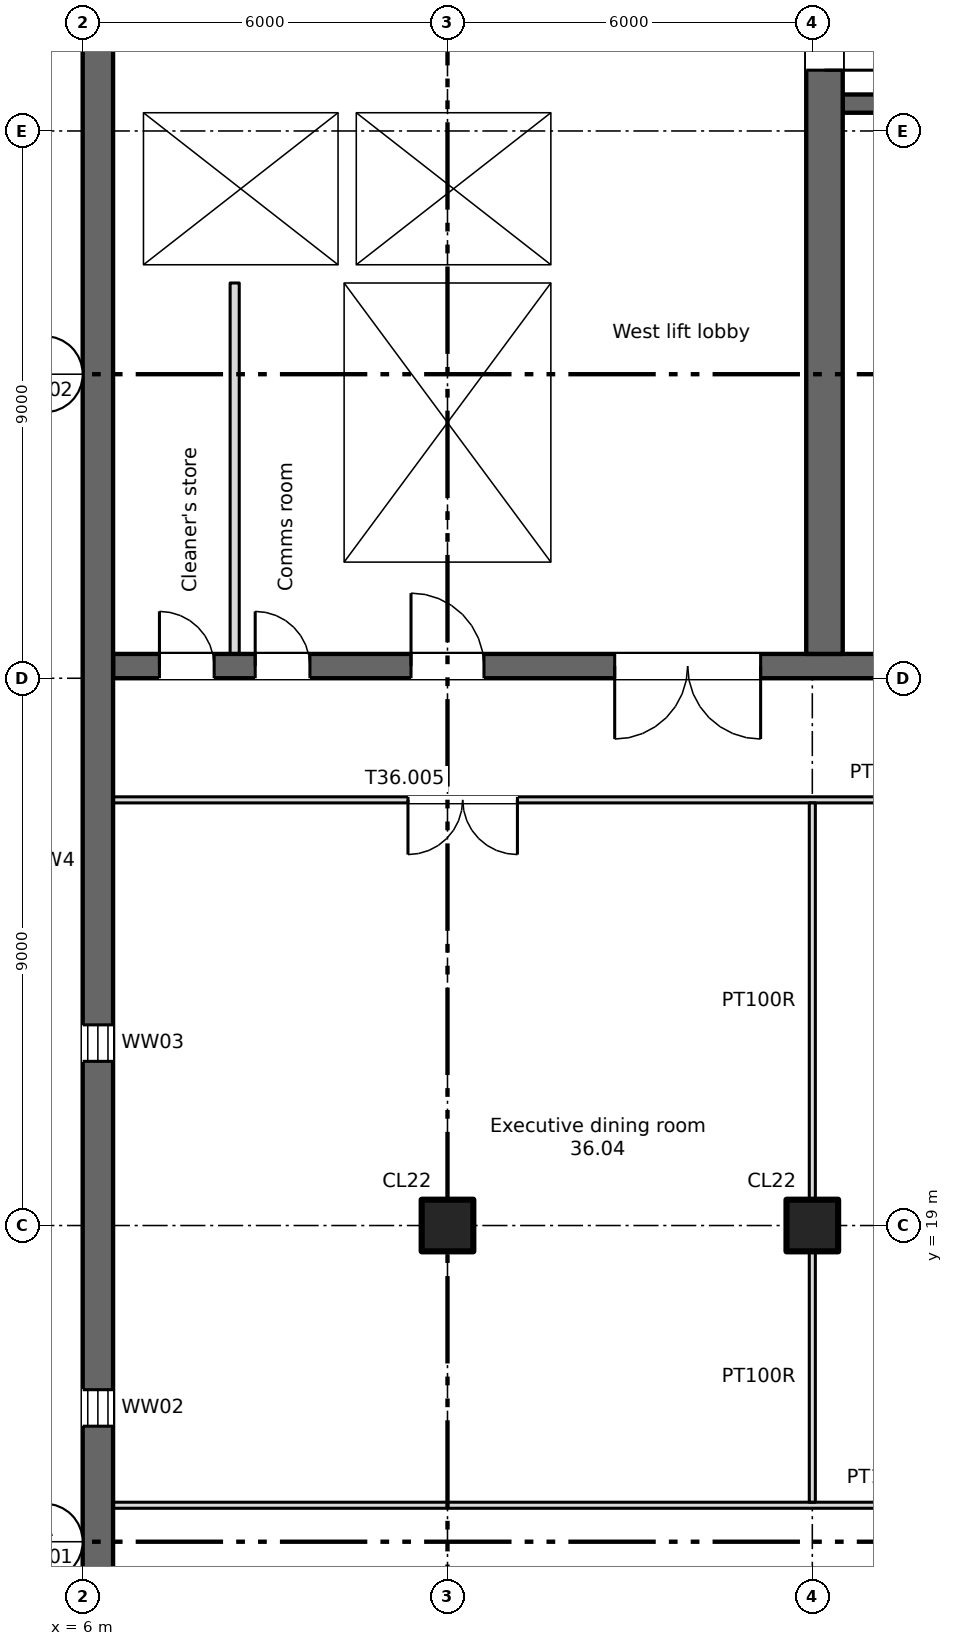
"""IFC4 building model, lengths in metres.
Left out: names, types, materials, properties, quantities, classifications, styles, units other than length and angle.
Written with IfcOpenShell. Run it as: python <this file> out.ifc"""

import sys

from ifc_helpers import new_model, si_unit, direction, frame, frame_2d, origin, origin_2d, place, context, subcontext, project, spatial, rectangle, extrude, element, fill, save


model = new_model("IFC4")
c1 = context("Model", 3, precision=1e-05, world=origin(), true_north=direction((0.0, 1.0)))
c2 = subcontext(c1, "Body", "Model", "MODEL_VIEW")
j1 = project(units=[si_unit("LENGTHUNIT", "METRE"), si_unit("PLANEANGLEUNIT", "RADIAN")], contexts=[c1])
p1 = place(None, origin())
s1 = spatial("IfcSite", under=j1, at=p1, CompositionType="ELEMENT")
p2 = place(p1, origin())
s2 = spatial("IfcBuilding", under=s1, at=p2, CompositionType="ELEMENT")
p3 = place(p2, frame((0.0, 0.0, 250.75)))
s3 = spatial("IfcBuildingStorey", under=s2, at=p3, CompositionType="ELEMENT", Elevation=250.75)
for number, where, z_axis, x_axis in (
    (1, (12.0, 19.0, 0.0), (0.0, 0.0, 1.0), (1.0, 0.0, 0.0)),
    (2, (18.0, 19.0, 0.0), (0.0, 0.0, 1.0), (1.0, 0.0, 0.0)),
):
    element("IfcColumn", number, at=place(p3, frame(where, z_axis=z_axis, x_axis=x_axis)), inside=s3, PredefinedType="COLUMN", context=c2, shape_type="SweptSolid", body=[
        extrude(rectangle(XDim=0.85, YDim=0.85, at=origin_2d()), origin(), (0.0, 0.0, 1.0), 3.4),
    ])
p4 = place(p3, frame((6.25, 8.5, 0.0), z_axis=(0.0, 0.0, 1.0), x_axis=(0.0, 1.0, 0.0)))
e3 = element("IfcWall", 3, at=p4, inside=s3, PredefinedType="SHEAR", context=c2, shape_type="SweptSolid", body=[
    extrude(rectangle(XDim=33.0, YDim=0.5, at=frame_2d((16.5, 0.0))), origin(), (0.0, 0.0, 1.0), 3.4),
])
p5 = place(p4, frame((1.2, 0.0, 0.6)))
e4 = element("IfcOpeningElement", 4, at=p5, cuts=e3, PredefinedType="OPENING", context=c2, shape_type="SweptSolid", body=[
    extrude(rectangle(XDim=0.6, YDim=2.4, at=frame_2d((0.3, 1.2))), frame((0.0, 0.26, 0.0), z_axis=(0.0, -1.0, 0.0), x_axis=(1.0, 0.0, 0.0)), (0.0, 0.0, 1.0), 0.52),
])
p6 = place(p4, frame((7.2, 0.0, 0.6)))
e5 = element("IfcOpeningElement", 5, at=p6, cuts=e3, PredefinedType="OPENING", context=c2, shape_type="SweptSolid", body=[
    extrude(rectangle(XDim=0.6, YDim=2.4, at=frame_2d((0.3, 1.2))), frame((0.0, 0.26, 0.0), z_axis=(0.0, -1.0, 0.0), x_axis=(1.0, 0.0, 0.0)), (0.0, 0.0, 1.0), 0.52),
])
p7 = place(p4, frame((13.2, 0.0, 0.6)))
e6 = element("IfcOpeningElement", 6, at=p7, cuts=e3, PredefinedType="OPENING", context=c2, shape_type="SweptSolid", body=[
    extrude(rectangle(XDim=0.6, YDim=2.4, at=frame_2d((0.3, 1.2))), frame((0.0, 0.26, 0.0), z_axis=(0.0, -1.0, 0.0), x_axis=(1.0, 0.0, 0.0)), (0.0, 0.0, 1.0), 0.52),
])
p8 = place(p3, frame((6.5, 28.2, 0.0), z_axis=(0.0, 0.0, 1.0), x_axis=(1.0, 0.0, 0.0)))
e7 = element("IfcWall", 7, at=p8, inside=s3, PredefinedType="SHEAR", context=c2, shape_type="SweptSolid", body=[
    extrude(rectangle(XDim=58.0, YDim=0.4, at=frame_2d((29.0, 0.0))), origin(), (0.0, 0.0, 1.0), 3.4),
])
p9 = place(p8, frame((12.762, 0.0, 0.0)))
e8 = element("IfcOpeningElement", 8, at=p9, cuts=e7, PredefinedType="OPENING", context=c2, shape_type="SweptSolid", body=[
    extrude(rectangle(XDim=0.9, YDim=2.1, at=frame_2d((0.45, 1.05))), frame((0.0, 0.21, 0.0), z_axis=(0.0, -1.0, 0.0), x_axis=(1.0, 0.0, 0.0)), (0.0, 0.0, 1.0), 0.42),
])
p10 = place(p8, frame((15.337, 0.0, 0.0)))
e9 = element("IfcOpeningElement", 9, at=p10, cuts=e7, PredefinedType="OPENING", context=c2, shape_type="SweptSolid", body=[
    extrude(rectangle(XDim=0.9, YDim=2.1, at=frame_2d((0.45, 1.05))), frame((0.0, 0.21, 0.0), z_axis=(0.0, -1.0, 0.0), x_axis=(1.0, 0.0, 0.0)), (0.0, 0.0, 1.0), 0.42),
])
p11 = place(p8, frame((50.05, 0.0, 0.0)))
e10 = element("IfcOpeningElement", 10, at=p11, cuts=e7, PredefinedType="OPENING", context=c2, shape_type="SweptSolid", body=[
    extrude(rectangle(XDim=0.9, YDim=2.1, at=frame_2d((0.45, 1.05))), frame((0.0, 0.21, 0.0), z_axis=(0.0, -1.0, 0.0), x_axis=(1.0, 0.0, 0.0)), (0.0, 0.0, 1.0), 0.42),
])
p12 = place(p8, frame((0.762, 0.0, 0.0)))
e11 = element("IfcOpeningElement", 11, at=p12, cuts=e7, PredefinedType="OPENING", context=c2, shape_type="SweptSolid", body=[
    extrude(rectangle(XDim=0.9, YDim=2.1, at=frame_2d((0.45, 1.05))), frame((0.0, 0.21, 0.0), z_axis=(0.0, -1.0, 0.0), x_axis=(1.0, 0.0, 0.0)), (0.0, 0.0, 1.0), 0.42),
])
p13 = place(p8, frame((2.337, 0.0, 0.0)))
e12 = element("IfcOpeningElement", 12, at=p13, cuts=e7, PredefinedType="OPENING", context=c2, shape_type="SweptSolid", body=[
    extrude(rectangle(XDim=0.9, YDim=2.1, at=frame_2d((0.45, 1.05))), frame((0.0, 0.21, 0.0), z_axis=(0.0, -1.0, 0.0), x_axis=(1.0, 0.0, 0.0)), (0.0, 0.0, 1.0), 0.42),
])
p14 = place(p8, frame((4.9, 0.0, 0.0)))
e13 = element("IfcOpeningElement", 13, at=p14, cuts=e7, PredefinedType="OPENING", context=c2, shape_type="SweptSolid", body=[
    extrude(rectangle(XDim=1.2, YDim=2.1, at=frame_2d((0.6, 1.05))), frame((0.0, 0.21, 0.0), z_axis=(0.0, -1.0, 0.0), x_axis=(1.0, 0.0, 0.0)), (0.0, 0.0, 1.0), 0.42),
])
p15 = place(p8, frame((31.9, 0.0, 0.0)))
e14 = element("IfcOpeningElement", 14, at=p15, cuts=e7, PredefinedType="OPENING", context=c2, shape_type="SweptSolid", body=[
    extrude(rectangle(XDim=1.2, YDim=2.1, at=frame_2d((0.6, 1.05))), frame((0.0, 0.21, 0.0), z_axis=(0.0, -1.0, 0.0), x_axis=(1.0, 0.0, 0.0)), (0.0, 0.0, 1.0), 0.42),
])
p16 = place(p8, frame((55.4, 0.0, 0.0)))
e15 = element("IfcOpeningElement", 15, at=p16, cuts=e7, PredefinedType="OPENING", context=c2, shape_type="SweptSolid", body=[
    extrude(rectangle(XDim=1.2, YDim=2.1, at=frame_2d((0.6, 1.05))), frame((0.0, 0.21, 0.0), z_axis=(0.0, -1.0, 0.0), x_axis=(1.0, 0.0, 0.0)), (0.0, 0.0, 1.0), 0.42),
])
p17 = place(p8, frame((21.9, 0.0, 0.0)))
e16 = element("IfcOpeningElement", 16, at=p17, cuts=e7, PredefinedType="OPENING", context=c2, shape_type="SweptSolid", body=[
    extrude(rectangle(XDim=1.2, YDim=2.1, at=frame_2d((0.6, 1.05))), frame((0.0, 0.21, 0.0), z_axis=(0.0, -1.0, 0.0), x_axis=(1.0, 0.0, 0.0)), (0.0, 0.0, 1.0), 0.42),
])
p18 = place(p8, frame((41.9, 0.0, 0.0)))
e17 = element("IfcOpeningElement", 17, at=p18, cuts=e7, PredefinedType="OPENING", context=c2, shape_type="SweptSolid", body=[
    extrude(rectangle(XDim=1.2, YDim=2.1, at=frame_2d((0.6, 1.05))), frame((0.0, 0.21, 0.0), z_axis=(0.0, -1.0, 0.0), x_axis=(1.0, 0.0, 0.0)), (0.0, 0.0, 1.0), 0.42),
])
p19 = place(p8, frame((25.05, 0.0, 0.0)))
e18 = element("IfcOpeningElement", 18, at=p19, cuts=e7, PredefinedType="OPENING", context=c2, shape_type="SweptSolid", body=[
    extrude(rectangle(XDim=2.4, YDim=2.1, at=frame_2d((1.2, 1.05))), frame((0.0, 0.21, 0.0), z_axis=(0.0, -1.0, 0.0), x_axis=(1.0, 0.0, 0.0)), (0.0, 0.0, 1.0), 0.42),
])
p20 = place(p8, frame((37.55, 0.0, 0.0)))
e19 = element("IfcOpeningElement", 19, at=p20, cuts=e7, PredefinedType="OPENING", context=c2, shape_type="SweptSolid", body=[
    extrude(rectangle(XDim=2.4, YDim=2.1, at=frame_2d((1.2, 1.05))), frame((0.0, 0.21, 0.0), z_axis=(0.0, -1.0, 0.0), x_axis=(1.0, 0.0, 0.0)), (0.0, 0.0, 1.0), 0.42),
])
p21 = place(p8, frame((8.25, 0.0, 0.0)))
e20 = element("IfcOpeningElement", 20, at=p21, cuts=e7, PredefinedType="OPENING", context=c2, shape_type="SweptSolid", body=[
    extrude(rectangle(XDim=2.4, YDim=2.1, at=frame_2d((1.2, 1.05))), frame((0.0, 0.21, 0.0), z_axis=(0.0, -1.0, 0.0), x_axis=(1.0, 0.0, 0.0)), (0.0, 0.0, 1.0), 0.42),
])
p22 = place(p8, frame((29.05, 0.0, 0.0)))
e21 = element("IfcOpeningElement", 21, at=p22, cuts=e7, PredefinedType="OPENING", context=c2, shape_type="SweptSolid", body=[
    extrude(rectangle(XDim=0.9, YDim=2.1, at=frame_2d((0.45, 1.05))), frame((0.0, 0.21, 0.0), z_axis=(0.0, -1.0, 0.0), x_axis=(1.0, 0.0, 0.0)), (0.0, 0.0, 1.0), 0.42),
])
p23 = place(p8, frame((35.05, 0.0, 0.0)))
e22 = element("IfcOpeningElement", 22, at=p23, cuts=e7, PredefinedType="OPENING", context=c2, shape_type="SweptSolid", body=[
    extrude(rectangle(XDim=0.9, YDim=2.1, at=frame_2d((0.45, 1.05))), frame((0.0, 0.21, 0.0), z_axis=(0.0, -1.0, 0.0), x_axis=(1.0, 0.0, 0.0)), (0.0, 0.0, 1.0), 0.42),
])
p24 = place(p3, frame((6.75, 28.4, 0.0), z_axis=(0.0, 0.0, 1.0), x_axis=(0.0, 1.0, 0.0)))
e23 = element("IfcWall", 23, at=p24, inside=s3, PredefinedType="SHEAR", context=c2, shape_type="SweptSolid", body=[
    extrude(rectangle(XDim=12.85, YDim=0.5, at=frame_2d((6.425, 0.0))), origin(), (0.0, 0.0, 1.0), 3.4),
])
p25 = place(p3, frame((18.2, 28.4, 0.0), z_axis=(0.0, 0.0, 1.0), x_axis=(0.0, 1.0, 0.0)))
e24 = element("IfcWall", 24, at=p25, inside=s3, PredefinedType="SHEAR", context=c2, shape_type="SweptSolid", body=[
    extrude(rectangle(XDim=17.0, YDim=0.6, at=frame_2d((8.5, 0.0))), origin(), (0.0, 0.0, 1.0), 3.4),
])
p26 = place(p25, frame((9.6, 0.0, 0.0)))
e25 = element("IfcOpeningElement", 25, at=p26, cuts=e24, PredefinedType="OPENING", context=c2, shape_type="SweptSolid", body=[
    extrude(rectangle(XDim=2.0, YDim=2.1, at=frame_2d((1.0, 1.05))), frame((0.0, 0.31, 0.0), z_axis=(0.0, -1.0, 0.0), x_axis=(1.0, 0.0, 0.0)), (0.0, 0.0, 1.0), 0.62),
])
p27 = place(p25, frame((15.45, 0.0, 0.0)))
e26 = element("IfcOpeningElement", 26, at=p27, cuts=e24, PredefinedType="OPENING", context=c2, shape_type="SweptSolid", body=[
    extrude(rectangle(XDim=1.2, YDim=2.1, at=frame_2d((0.6, 1.05))), frame((0.0, 0.31, 0.0), z_axis=(0.0, -1.0, 0.0), x_axis=(1.0, 0.0, 0.0)), (0.0, 0.0, 1.0), 0.62),
])
for number, where, z_axis, x_axis in (
    (27, (10.15, 28.4, 0.0), (0.0, 0.0, 1.0), (0.0, 1.0, 0.0)),
    (28, (13.85, 28.4, 0.0), (0.0, 0.0, 1.0), (0.0, 1.0, 0.0)),
):
    element("IfcWall", number, at=place(p3, frame(where, z_axis=z_axis, x_axis=x_axis)), inside=s3, PredefinedType="SHEAR", context=c2, shape_type="SweptSolid", body=[
        extrude(rectangle(XDim=6.1, YDim=0.3, at=frame_2d((3.05, 0.0))), origin(), (0.0, 0.0, 1.0), 3.4),
    ])
p28 = place(p3, frame((7.0, 34.65, 0.0), z_axis=(0.0, 0.0, 1.0), x_axis=(1.0, 0.0, 0.0)))
e29 = element("IfcWall", 29, at=p28, inside=s3, PredefinedType="SHEAR", context=c2, shape_type="SweptSolid", body=[
    extrude(rectangle(XDim=7.0, YDim=0.3, at=frame_2d((3.5, 0.0))), origin(), (0.0, 0.0, 1.0), 3.4),
])
p29 = place(p3, frame((18.5, 34.65, 0.0), z_axis=(0.0, 0.0, 1.0), x_axis=(1.0, 0.0, 0.0)))
e30 = element("IfcWall", 30, at=p29, inside=s3, PredefinedType="SHEAR", context=c2, shape_type="SweptSolid", body=[
    extrude(rectangle(XDim=12.2, YDim=0.3, at=frame_2d((6.1, 0.0))), origin(), (0.0, 0.0, 1.0), 3.4),
])
p30 = place(p29, frame((9.8, 0.0, 0.0)))
e31 = element("IfcOpeningElement", 31, at=p30, cuts=e30, PredefinedType="OPENING", context=c2, shape_type="SweptSolid", body=[
    extrude(rectangle(XDim=1.1, YDim=2.1, at=frame_2d((0.55, 1.05))), frame((0.0, 0.16, 0.0), z_axis=(0.0, -1.0, 0.0), x_axis=(1.0, 0.0, 0.0)), (0.0, 0.0, 1.0), 0.32),
])
p31 = place(p3, frame((7.0, 37.45, 0.0), z_axis=(0.0, 0.0, 1.0), x_axis=(1.0, 0.0, 0.0)))
e32 = element("IfcWall", 32, at=p31, inside=s3, PredefinedType="SHEAR", context=c2, shape_type="SweptSolid", body=[
    extrude(rectangle(XDim=7.0, YDim=0.3, at=frame_2d((3.5, 0.0))), origin(), (0.0, 0.0, 1.0), 3.4),
])
p32 = place(p31, frame((1.05, 0.0, 0.0)))
e33 = element("IfcOpeningElement", 33, at=p32, cuts=e32, PredefinedType="OPENING", context=c2, shape_type="SweptSolid", body=[
    extrude(rectangle(XDim=1.1, YDim=2.1, at=frame_2d((0.55, 1.05))), frame((0.0, 0.16, 0.0), z_axis=(0.0, -1.0, 0.0), x_axis=(1.0, 0.0, 0.0)), (0.0, 0.0, 1.0), 0.32),
])
p33 = place(p31, frame((4.55, 0.0, 0.0)))
e34 = element("IfcOpeningElement", 34, at=p33, cuts=e32, PredefinedType="OPENING", context=c2, shape_type="SweptSolid", body=[
    extrude(rectangle(XDim=1.1, YDim=2.1, at=frame_2d((0.55, 1.05))), frame((0.0, 0.16, 0.0), z_axis=(0.0, -1.0, 0.0), x_axis=(1.0, 0.0, 0.0)), (0.0, 0.0, 1.0), 0.32),
])
p34 = place(p3, frame((30.7, 37.45, 0.0), z_axis=(0.0, 0.0, 1.0), x_axis=(-1.0, 0.0, 0.0)))
e35 = element("IfcWall", 35, at=p34, inside=s3, PredefinedType="SHEAR", context=c2, shape_type="SweptSolid", body=[
    extrude(rectangle(XDim=12.2, YDim=0.3, at=frame_2d((6.1, 0.0))), origin(), (0.0, 0.0, 1.0), 3.4),
])
p35 = place(p34, frame((7.4, 0.0, 0.0)))
e36 = element("IfcOpeningElement", 36, at=p35, cuts=e35, PredefinedType="OPENING", context=c2, shape_type="SweptSolid", body=[
    extrude(rectangle(XDim=0.9, YDim=2.1, at=frame_2d((0.45, 1.05))), frame((0.0, 0.16, 0.0), z_axis=(0.0, -1.0, 0.0), x_axis=(1.0, 0.0, 0.0)), (0.0, 0.0, 1.0), 0.32),
])
for number, where, z_axis, x_axis in (
    (37, (13.85, 34.8, 0.0), (0.0, 0.0, 1.0), (0.0, 1.0, 0.0)),
    (38, (10.35, 34.8, 0.0), (0.0, 0.0, 1.0), (0.0, 1.0, 0.0)),
):
    element("IfcWall", number, at=place(p3, frame(where, z_axis=z_axis, x_axis=x_axis)), inside=s3, PredefinedType="SHEAR", context=c2, shape_type="SweptSolid", body=[
        extrude(rectangle(XDim=2.5, YDim=0.3, at=frame_2d((1.25, 0.0))), origin(), (0.0, 0.0, 1.0), 3.4),
    ])
p36 = place(p3, frame((8.5, 28.4, 0.0), z_axis=(0.0, 0.0, 1.0), x_axis=(0.0, 1.0, 0.0)))
e39 = element("IfcWall", 39, at=p36, inside=s3, PredefinedType="PARTITIONING", context=c2, shape_type="SweptSolid", body=[
    extrude(rectangle(XDim=6.1, YDim=0.15, at=frame_2d((3.05, 0.0))), origin(), (0.0, 0.0, 1.0), 3.4),
])
p37 = place(p3, frame((6.5, 14.4, 0.0), z_axis=(0.0, 0.0, 1.0), x_axis=(1.0, 0.0, 0.0)))
e40 = element("IfcWall", 40, at=p37, inside=s3, PredefinedType="PARTITIONING", context=c2, shape_type="SweptSolid", body=[
    extrude(rectangle(XDim=25.35, YDim=0.1, at=frame_2d((12.675, 0.0))), origin(), (0.0, 0.0, 1.0), 3.4),
])
p38 = place(p3, frame((6.5, 26.0, 0.0), z_axis=(0.0, 0.0, 1.0), x_axis=(1.0, 0.0, 0.0)))
e41 = element("IfcWall", 41, at=p38, inside=s3, PredefinedType="PARTITIONING", context=c2, shape_type="SweptSolid", body=[
    extrude(rectangle(XDim=25.45, YDim=0.1, at=frame_2d((12.725, 0.0))), origin(), (0.0, 0.0, 1.0), 3.4),
])
p39 = place(p38, frame((4.85, 0.0, 0.0)))
e42 = element("IfcOpeningElement", 42, at=p39, cuts=e41, PredefinedType="OPENING", context=c2, shape_type="SweptSolid", body=[
    extrude(rectangle(XDim=1.8, YDim=2.1, at=frame_2d((0.9, 1.05))), frame((0.0, 0.06, 0.0), z_axis=(0.0, -1.0, 0.0), x_axis=(1.0, 0.0, 0.0)), (0.0, 0.0, 1.0), 0.12),
])
p40 = place(p38, frame((14.475, 0.0, 0.0)))
e43 = element("IfcOpeningElement", 43, at=p40, cuts=e41, PredefinedType="OPENING", context=c2, shape_type="SweptSolid", body=[
    extrude(rectangle(XDim=1.0, YDim=2.1, at=frame_2d((0.5, 1.05))), frame((0.0, 0.06, 0.0), z_axis=(0.0, -1.0, 0.0), x_axis=(1.0, 0.0, 0.0)), (0.0, 0.0, 1.0), 0.12),
])
p41 = place(p38, frame((21.425, 0.0, 0.0)))
e44 = element("IfcOpeningElement", 44, at=p41, cuts=e41, PredefinedType="OPENING", context=c2, shape_type="SweptSolid", body=[
    extrude(rectangle(XDim=1.0, YDim=2.1, at=frame_2d((0.5, 1.05))), frame((0.0, 0.06, 0.0), z_axis=(0.0, -1.0, 0.0), x_axis=(1.0, 0.0, 0.0)), (0.0, 0.0, 1.0), 0.12),
])
p42 = place(p3, frame((18.0, 14.45, 0.0), z_axis=(0.0, 0.0, 1.0), x_axis=(0.0, 1.0, 0.0)))
e45 = element("IfcWall", 45, at=p42, inside=s3, PredefinedType="PARTITIONING", context=c2, shape_type="SweptSolid", body=[
    extrude(rectangle(XDim=4.125, YDim=0.1, at=frame_2d((2.062, 0.0))), origin(), (0.0, 0.0, 1.0), 3.4),
])
p43 = place(p3, frame((18.0, 19.425, 0.0), z_axis=(0.0, 0.0, 1.0), x_axis=(0.0, 1.0, 0.0)))
e46 = element("IfcWall", 46, at=p43, inside=s3, PredefinedType="PARTITIONING", context=c2, shape_type="SweptSolid", body=[
    extrude(rectangle(XDim=6.525, YDim=0.1, at=frame_2d((3.262, 0.0))), origin(), (0.0, 0.0, 1.0), 3.4),
])
p44 = place(p6, origin())
e47 = element("IfcWindow", 47, at=p44, inside=s3, PartitioningType="SINGLE_PANEL", PredefinedType="WINDOW", context=c2, shape_type="SweptSolid", body=[
    extrude(rectangle(XDim=0.6, YDim=2.4, at=frame_2d((0.3, 1.2))), frame((0.0, 0.03, 0.0), z_axis=(0.0, -1.0, 0.0), x_axis=(1.0, 0.0, 0.0)), (0.0, 0.0, 1.0), 0.06),
])
fill(e5, e47)
p45 = place(p7, origin())
e48 = element("IfcWindow", 48, at=p45, inside=s3, PartitioningType="SINGLE_PANEL", PredefinedType="WINDOW", context=c2, shape_type="SweptSolid", body=[
    extrude(rectangle(XDim=0.6, YDim=2.4, at=frame_2d((0.3, 1.2))), frame((0.0, 0.03, 0.0), z_axis=(0.0, -1.0, 0.0), x_axis=(1.0, 0.0, 0.0)), (0.0, 0.0, 1.0), 0.06),
])
fill(e6, e48)
p46 = place(p12, origin())
e49 = element("IfcDoor", 49, at=p46, inside=s3, OperationType="SINGLE_SWING_LEFT", PredefinedType="DOOR", context=c2, shape_type="SweptSolid", body=[
    extrude(rectangle(XDim=0.9, YDim=2.1, at=frame_2d((0.45, 1.05))), frame((0.0, 0.025, 0.0), z_axis=(0.0, -1.0, 0.0), x_axis=(1.0, 0.0, 0.0)), (0.0, 0.0, 1.0), 0.05),
])
fill(e11, e49)
p47 = place(p13, origin())
e50 = element("IfcDoor", 50, at=p47, inside=s3, OperationType="SINGLE_SWING_LEFT", PredefinedType="DOOR", context=c2, shape_type="SweptSolid", body=[
    extrude(rectangle(XDim=0.9, YDim=2.1, at=frame_2d((0.45, 1.05))), frame((0.0, 0.025, 0.0), z_axis=(0.0, -1.0, 0.0), x_axis=(1.0, 0.0, 0.0)), (0.0, 0.0, 1.0), 0.05),
])
fill(e12, e50)
p48 = place(p32, origin())
e51 = element("IfcDoor", 51, at=p48, inside=s3, OperationType="SLIDING_TO_LEFT", PredefinedType="DOOR", context=c2, shape_type="SweptSolid", body=[
    extrude(rectangle(XDim=1.1, YDim=2.1, at=frame_2d((0.55, 1.05))), frame((0.0, 0.025, 0.0), z_axis=(0.0, -1.0, 0.0), x_axis=(1.0, 0.0, 0.0)), (0.0, 0.0, 1.0), 0.05),
])
fill(e33, e51)
p49 = place(p33, origin())
e52 = element("IfcDoor", 52, at=p49, inside=s3, OperationType="SLIDING_TO_LEFT", PredefinedType="DOOR", context=c2, shape_type="SweptSolid", body=[
    extrude(rectangle(XDim=1.1, YDim=2.1, at=frame_2d((0.55, 1.05))), frame((0.0, 0.025, 0.0), z_axis=(0.0, -1.0, 0.0), x_axis=(1.0, 0.0, 0.0)), (0.0, 0.0, 1.0), 0.05),
])
fill(e34, e52)
p50 = place(p14, origin())
e53 = element("IfcDoor", 53, at=p50, inside=s3, OperationType="SINGLE_SWING_LEFT", PredefinedType="DOOR", context=c2, shape_type="SweptSolid", body=[
    extrude(rectangle(XDim=1.2, YDim=2.1, at=frame_2d((0.6, 1.05))), frame((0.0, 0.025, 0.0), z_axis=(0.0, -1.0, 0.0), x_axis=(1.0, 0.0, 0.0)), (0.0, 0.0, 1.0), 0.05),
])
fill(e13, e53)
p51 = place(p21, origin())
e54 = element("IfcDoor", 54, at=p51, inside=s3, OperationType="DOUBLE_DOOR_SINGLE_SWING", PredefinedType="DOOR", context=c2, shape_type="SweptSolid", body=[
    extrude(rectangle(XDim=2.4, YDim=2.1, at=frame_2d((1.2, 1.05))), frame((0.0, 0.025, 0.0), z_axis=(0.0, -1.0, 0.0), x_axis=(1.0, 0.0, 0.0)), (0.0, 0.0, 1.0), 0.05),
])
fill(e20, e54)
p52 = place(p26, origin())
e55 = element("IfcDoor", 55, at=p52, inside=s3, OperationType="DOUBLE_DOOR_SINGLE_SWING", PredefinedType="DOOR", context=c2, shape_type="SweptSolid", body=[
    extrude(rectangle(XDim=2.0, YDim=2.1, at=frame_2d((1.0, 1.05))), frame((0.0, 0.025, 0.0), z_axis=(0.0, -1.0, 0.0), x_axis=(1.0, 0.0, 0.0)), (0.0, 0.0, 1.0), 0.05),
])
fill(e25, e55)
p53 = place(p39, origin())
e56 = element("IfcDoor", 56, at=p53, inside=s3, OperationType="DOUBLE_DOOR_SINGLE_SWING", PredefinedType="DOOR", context=c2, shape_type="SweptSolid", body=[
    extrude(rectangle(XDim=1.8, YDim=2.1, at=frame_2d((0.9, 1.05))), frame((0.0, 0.025, 0.0), z_axis=(0.0, -1.0, 0.0), x_axis=(1.0, 0.0, 0.0)), (0.0, 0.0, 1.0), 0.05),
])
fill(e42, e56)
save(model, sys.argv[1])
